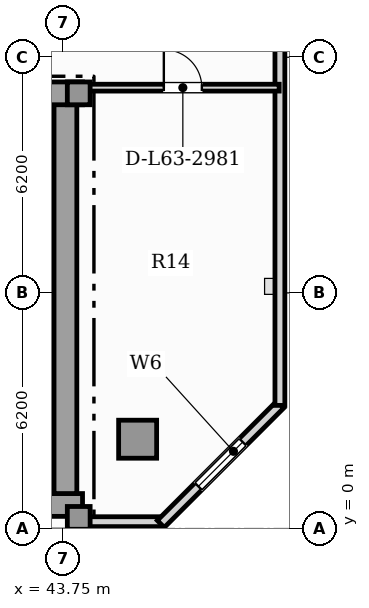
"""IFC4 building model, lengths in metres.
Left out: names, types, materials, properties, quantities, classifications, styles, units other than length and angle.
Written with IfcOpenShell. Run it as: python <this file> out.ifc"""

import sys

from ifc_helpers import new_model, si_unit, direction, frame, frame_2d, origin, origin_2d, place, context, subcontext, project, spatial, rectangle, hollow_rectangle, extrude, element, fill, save


model = new_model("IFC4")
c1 = context("Model", 3, precision=1e-05, world=origin(), true_north=direction((0.0, 1.0)))
c2 = subcontext(c1, "Body", "Model", "MODEL_VIEW")
j1 = project(units=[si_unit("LENGTHUNIT", "METRE"), si_unit("PLANEANGLEUNIT", "RADIAN")], contexts=[c1])
p1 = place(None, origin())
s1 = spatial("IfcSite", under=j1, at=p1, CompositionType="ELEMENT")
p2 = place(p1, origin())
s2 = spatial("IfcBuilding", under=s1, at=p2, CompositionType="ELEMENT")
p3 = place(p2, frame((0.0, 0.0, 256.75)))
s3 = spatial("IfcBuildingStorey", under=s2, at=p3, CompositionType="ELEMENT", Elevation=256.75)
p4 = place(p3, frame((13.25, 0.62, 0.0), z_axis=(0.0, 0.0, 1.0), x_axis=(1.0, 0.0, 0.0)))
e1 = element("IfcWall", 1, at=p4, inside=s3, PredefinedType="SHEAR", context=c2, shape_type="SweptSolid", body=[
    extrude(rectangle(XDim=31.0, YDim=0.6, at=frame_2d((15.5, 0.0))), origin(), (0.0, 0.0, 1.0), 3.65),
])
p5 = place(p3, frame((43.8, 0.92, 0.0), z_axis=(0.0, 0.0, 1.0), x_axis=(0.0, 1.0, 0.0)))
e2 = element("IfcWall", 2, at=p5, inside=s3, PredefinedType="SHEAR", context=c2, shape_type="SweptSolid", body=[
    extrude(rectangle(XDim=10.53, YDim=0.6, at=frame_2d((5.265, 0.0))), origin(), (0.0, 0.0, 1.0), 3.65),
])
p6 = place(p3, frame((41.3, 11.45, 0.0), z_axis=(0.0, 0.0, 1.0), x_axis=(1.0, 0.0, 0.0)))
e3 = element("IfcWall", 3, at=p6, inside=s3, PredefinedType="SHEAR", context=c2, shape_type="SweptSolid", body=[
    extrude(rectangle(XDim=2.95, YDim=0.6, at=frame_2d((1.475, 0.0))), origin(), (0.0, 0.0, 1.0), 3.65),
])
for number, where, z_axis, x_axis in (
    (4, (44.15, 0.28, 0.0), (0.0, 0.0, 1.0), (1.0, 0.0, 0.0)),
    (5, (44.15, 11.45, 0.0), (0.0, 0.0, 1.0), (1.0, 0.0, 0.0)),
):
    element("IfcColumn", number, at=place(p3, frame(where, z_axis=z_axis, x_axis=x_axis)), inside=s3, PredefinedType="COLUMN", context=c2, shape_type="SweptSolid", body=[
        extrude(rectangle(XDim=0.6, YDim=0.6, at=origin_2d()), origin(), (0.0, 0.0, 1.0), 3.85),
    ])
p7 = place(p3, frame((45.7, 2.35, 0.0), z_axis=(0.0, 0.0, 1.0), x_axis=(1.0, 0.0, 0.0)))
e6 = element("IfcColumn", 6, at=p7, inside=s3, PredefinedType="USERDEFINED", context=c2, shape_type="SweptSolid", body=[
    extrude(hollow_rectangle(XDim=1.0, YDim=1.0, WallThickness=0.06, at=origin_2d()), origin(), (0.0, 0.0, 1.0), 3.85),
])
p8 = place(p3, frame((44.25, 0.18, 0.0), z_axis=(0.0, 0.0, 1.0), x_axis=(1.0, 0.0, 0.0)))
e7 = element("IfcWall", 7, at=p8, inside=s3, PredefinedType="SOLIDWALL", context=c2, shape_type="SweptSolid", body=[
    extrude(rectangle(XDim=2.083, YDim=0.26, at=frame_2d((1.042, 0.0))), origin(), (0.0, 0.0, 1.0), 3.65),
])
p9 = place(p3, frame((46.31, 0.12, 0.0), z_axis=(0.0, 0.0, 1.0), x_axis=(0.707079321262, 0.707134240044, 0.0)))
e8 = element("IfcWall", 8, at=p9, inside=s3, PredefinedType="SOLIDWALL", context=c2, shape_type="SweptSolid", body=[
    extrude(rectangle(XDim=4.446, YDim=0.26, at=frame_2d((2.223, 0.0))), origin(), (0.0, 0.0, 1.0), 3.65),
])
p10 = place(p9, frame((1.398, 0.0, 0.88)))
e9 = element("IfcOpeningElement", 9, at=p10, cuts=e8, PredefinedType="OPENING", context=c2, shape_type="SweptSolid", body=[
    extrude(rectangle(XDim=1.65, YDim=2.0, at=frame_2d((0.825, 1.0))), frame((0.0, 0.14, 0.0), z_axis=(0.0, -1.0, 0.0), x_axis=(1.0, 0.0, 0.0)), (0.0, 0.0, 1.0), 0.28),
])
p11 = place(p3, frame((49.443, 3.24, 0.0), z_axis=(0.0, 0.0, 1.0), x_axis=(0.0, 1.0, 0.0)))
e10 = element("IfcWall", 10, at=p11, inside=s3, PredefinedType="SOLIDWALL", context=c2, shape_type="SweptSolid", body=[
    extrude(rectangle(XDim=29.486, YDim=0.26, at=frame_2d((14.743, 0.0))), origin(), (0.0, 0.0, 1.0), 3.19),
])
p12 = place(p11, frame((24.06, 0.0, 0.85)))
e11 = element("IfcOpeningElement", 11, at=p12, cuts=e10, PredefinedType="OPENING", context=c2, shape_type="SweptSolid", body=[
    extrude(rectangle(XDim=0.9, YDim=1.4, at=frame_2d((0.45, 0.7))), frame((0.0, 0.14, 0.0), z_axis=(0.0, -1.0, 0.0), x_axis=(1.0, 0.0, 0.0)), (0.0, 0.0, 1.0), 0.28),
])
p13 = place(p11, frame((11.531, 0.0, 0.85)))
e12 = element("IfcOpeningElement", 12, at=p13, cuts=e10, PredefinedType="OPENING", context=c2, shape_type="SweptSolid", body=[
    extrude(rectangle(XDim=0.9, YDim=1.4, at=frame_2d((0.45, 0.7))), frame((0.0, 0.14, 0.0), z_axis=(0.0, -1.0, 0.0), x_axis=(1.0, 0.0, 0.0)), (0.0, 0.0, 1.0), 0.28),
])
p14 = place(p11, frame((18.116, 0.0, 0.85)))
e13 = element("IfcOpeningElement", 13, at=p14, cuts=e10, PredefinedType="OPENING", context=c2, shape_type="SweptSolid", body=[
    extrude(rectangle(XDim=0.9, YDim=1.4, at=frame_2d((0.45, 0.7))), frame((0.0, 0.14, 0.0), z_axis=(0.0, -1.0, 0.0), x_axis=(1.0, 0.0, 0.0)), (0.0, 0.0, 1.0), 0.28),
])
p15 = place(p11, frame((26.258, 0.0, 0.85)))
e14 = element("IfcOpeningElement", 14, at=p15, cuts=e10, PredefinedType="OPENING", context=c2, shape_type="SweptSolid", body=[
    extrude(rectangle(XDim=0.9, YDim=1.4, at=frame_2d((0.45, 0.7))), frame((0.0, 0.14, 0.0), z_axis=(0.0, -1.0, 0.0), x_axis=(1.0, 0.0, 0.0)), (0.0, 0.0, 1.0), 0.28),
])
p16 = place(p3, frame((40.06, 8.52, 0.0), z_axis=(0.0, 0.0, 1.0), x_axis=(1.0, 0.0, 0.0)))
e15 = element("IfcWall", 15, at=p16, inside=s3, PredefinedType="SOLIDWALL", context=c2, shape_type="SweptSolid", body=[
    extrude(rectangle(XDim=3.4, YDim=0.22, at=frame_2d((1.7, 0.0))), origin(), (0.0, 0.0, 1.0), 3.65),
])
p17 = place(p16, frame((1.125, 0.0, 0.0)))
e16 = element("IfcOpeningElement", 16, at=p17, cuts=e15, PredefinedType="OPENING", context=c2, shape_type="SweptSolid", body=[
    extrude(rectangle(XDim=1.15, YDim=2.2, at=frame_2d((0.575, 1.1))), frame((0.0, 0.12, 0.0), z_axis=(0.0, -1.0, 0.0), x_axis=(1.0, 0.0, 0.0)), (0.0, 0.0, 1.0), 0.24),
])
p18 = place(p3, frame((44.355, 11.6, 0.0), z_axis=(0.0, 0.0, 1.0), x_axis=(1.0, 0.0, 0.0)))
e17 = element("IfcWall", 17, at=p18, inside=s3, PredefinedType="PARTITIONING", context=c2, shape_type="SweptSolid", body=[
    extrude(rectangle(XDim=5.069, YDim=0.18, at=frame_2d((2.534, 0.0))), origin(), (0.0, 0.0, 1.0), 3.65),
])
p19 = place(p18, frame((2.034, 0.0, 0.0)))
e18 = element("IfcOpeningElement", 18, at=p19, cuts=e17, PredefinedType="OPENING", context=c2, shape_type="SweptSolid", body=[
    extrude(rectangle(XDim=1.0, YDim=2.15, at=frame_2d((0.5, 1.075))), frame((0.0, 0.1, 0.0), z_axis=(0.0, -1.0, 0.0), x_axis=(1.0, 0.0, 0.0)), (0.0, 0.0, 1.0), 0.2),
])
p20 = place(p10, origin())
e19 = element("IfcWindow", 19, at=p20, inside=s3, PartitioningType="SINGLE_PANEL", PredefinedType="WINDOW", context=c2, shape_type="SweptSolid", body=[
    extrude(rectangle(XDim=1.65, YDim=2.0, at=frame_2d((0.825, 1.0))), frame((0.0, 0.03, 0.0), z_axis=(0.0, -1.0, 0.0), x_axis=(1.0, 0.0, 0.0)), (0.0, 0.0, 1.0), 0.06),
])
fill(e9, e19)
p21 = place(p19, origin())
e20 = element("IfcDoor", 20, at=p21, inside=s3, OperationType="SINGLE_SWING_LEFT", PredefinedType="DOOR", context=c2, shape_type="SweptSolid", body=[
    extrude(rectangle(XDim=1.0, YDim=2.15, at=frame_2d((0.5, 1.075))), frame((0.0, 0.025, 0.0), z_axis=(0.0, -1.0, 0.0), x_axis=(1.0, 0.0, 0.0)), (0.0, 0.0, 1.0), 0.05),
])
fill(e18, e20)
save(model, sys.argv[1])
